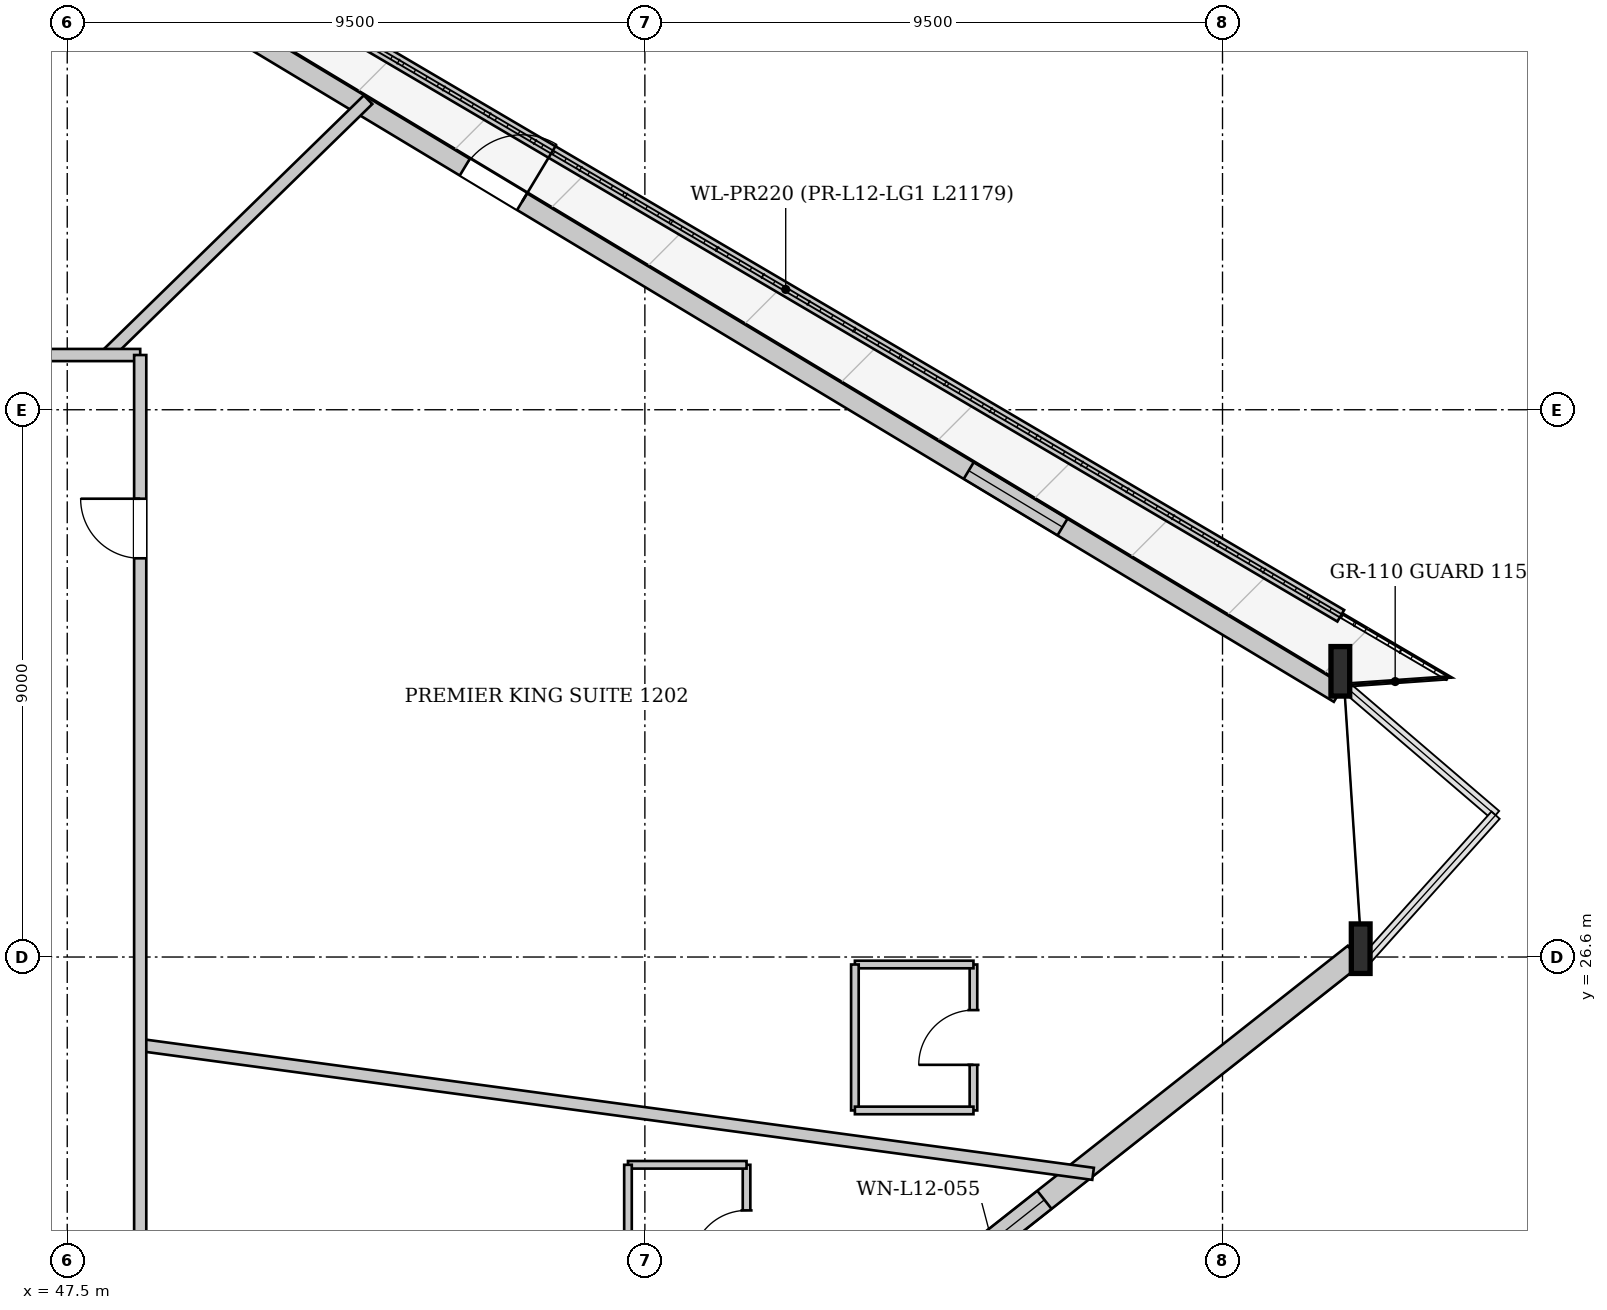
"""IFC4 building model, lengths in metres.
Left out: names, types, materials, properties, quantities, classifications, styles, units other than length and angle.
Written with IfcOpenShell. Run it as: python <this file> out.ifc"""

import sys

from ifc_helpers import new_model, si_unit, direction, frame, frame_2d, origin, origin_2d, place, context, subcontext, project, spatial, rectangle, i_section, extrude, source, transform, mapped, element, fill, save


model = new_model("IFC4")
c1 = context("Model", 3, precision=1e-05, world=origin(), true_north=direction((0.0, 1.0)))
c2 = subcontext(c1, "Body", "Model", "MODEL_VIEW")
j1 = project(units=[si_unit("LENGTHUNIT", "METRE"), si_unit("PLANEANGLEUNIT", "RADIAN")], contexts=[c1])
p1 = place(None, origin())
s1 = spatial("IfcSite", under=j1, at=p1, CompositionType="ELEMENT")
p2 = place(p1, origin())
s2 = spatial("IfcBuilding", under=s1, at=p2, CompositionType="ELEMENT")
p3 = place(p2, frame((0.0, 0.0, 50.6)))
s3 = spatial("IfcBuildingStorey", under=s2, at=p3, CompositionType="ELEMENT", Elevation=50.6)
m1 = source(origin(), c2, "Body", "SweptSolid", [
    extrude(i_section(OverallWidth=0.308, OverallDepth=0.814, WebThickness=0.021, FlangeThickness=0.04, at=origin_2d()), origin(), (0.0, 0.0, 1.0), 3.422),
])
p4 = place(p3, frame((68.796, 26.488, 0.0), z_axis=(-0.013841272978, 0.14576144688, 0.989222937343), x_axis=(-0.995521714847, -0.09453314375, 0.0)))
e1 = element("IfcColumn", 1, at=p4, inside=s3, PredefinedType="COLUMN", context=c2, shape_type="MappedRepresentation", body=[
    mapped(m1, transform((0.0, 0.0, 0.0), x_axis=(1.0, 0.0, 0.0), y_axis=(0.0, 1.0, 0.0), z_axis=(0.0, 0.0, 1.0), scale=1.0)),
])
m2 = source(origin(), c2, "Body", "SweptSolid", [
    extrude(i_section(OverallWidth=0.308, OverallDepth=0.814, WebThickness=0.021, FlangeThickness=0.04, at=origin_2d()), origin(), (0.0, 0.0, 1.0), 3.417),
])
p5 = place(p3, frame((68.496, 31.071, 0.0), z_axis=(-0.0340049427, 0.133233651545, 0.990501114572), x_axis=(-0.9689389037, -0.247300224215, 0.0)))
e2 = element("IfcColumn", 2, at=p5, inside=s3, PredefinedType="COLUMN", context=c2, shape_type="MappedRepresentation", body=[
    mapped(m2, transform((0.0, 0.0, 0.0), x_axis=(1.0, 0.0, 0.0), y_axis=(0.0, 1.0, 0.0), z_axis=(0.0, 0.0, 1.0), scale=1.0)),
])
p6 = place(p3, frame((47.967, 43.245, 0.0), z_axis=(0.0, 0.0, 1.0), x_axis=(0.856683150215, -0.515842980119, 0.0)))
e3 = element("IfcWall", 3, at=p6, inside=s3, PredefinedType="SOLIDWALL", context=c2, shape_type="SweptSolid", body=[
    extrude(rectangle(XDim=23.867, YDim=0.32, at=frame_2d((11.933, 0.0))), origin(), (0.0, 0.0, 1.0), 2.592),
])
p7 = place(p6, frame((7.087, 0.0, 0.0)))
e4 = element("IfcOpeningElement", 4, at=p7, cuts=e3, PredefinedType="OPENING", context=c2, shape_type="SweptSolid", body=[
    extrude(rectangle(XDim=1.1, YDim=2.3, at=frame_2d((0.55, 1.15))), frame((0.0, 0.17, 0.0), z_axis=(0.0, -1.0, 0.0), x_axis=(1.0, 0.0, 0.0)), (0.0, 0.0, 1.0), 0.34),
])
p8 = place(p6, frame((16.761, 0.0, 0.272)))
e5 = element("IfcOpeningElement", 5, at=p8, cuts=e3, PredefinedType="OPENING", context=c2, shape_type="SweptSolid", body=[
    extrude(rectangle(XDim=1.8, YDim=2.2, at=frame_2d((0.9, 1.1))), frame((0.0, 0.17, 0.0), z_axis=(0.0, -1.0, 0.0), x_axis=(1.0, 0.0, 0.0)), (0.0, 0.0, 1.0), 0.34),
])
p9 = place(p3, frame((68.679, 26.637, 0.0), z_axis=(0.0, 0.0, 1.0), x_axis=(-0.785087909817, -0.619384350674, 0.0)))
e6 = element("IfcWall", 6, at=p9, inside=s3, PredefinedType="SOLIDWALL", context=c2, shape_type="SweptSolid", body=[
    extrude(rectangle(XDim=24.487, YDim=0.38, at=frame_2d((12.244, 0.0))), origin(), (0.0, 0.0, 1.0), 2.592),
])
p10 = place(p9, frame((6.506, 0.0, 0.222)))
e7 = element("IfcOpeningElement", 7, at=p10, cuts=e6, PredefinedType="OPENING", context=c2, shape_type="SweptSolid", body=[
    extrude(rectangle(XDim=2.2, YDim=2.25, at=frame_2d((1.1, 1.125))), frame((0.0, 0.2, 0.0), z_axis=(0.0, -1.0, 0.0), x_axis=(1.0, 0.0, 0.0)), (0.0, 0.0, 1.0), 0.4),
])
p11 = place(p9, frame((16.531, 0.0, 0.222)))
e8 = element("IfcOpeningElement", 8, at=p11, cuts=e6, PredefinedType="OPENING", context=c2, shape_type="SweptSolid", body=[
    extrude(rectangle(XDim=2.2, YDim=2.25, at=frame_2d((1.1, 1.125))), frame((0.0, 0.2, 0.0), z_axis=(0.0, -1.0, 0.0), x_axis=(1.0, 0.0, 0.0)), (0.0, 0.0, 1.0), 0.4),
])
p12 = place(p3, frame((68.445, 32.212, 0.0), z_axis=(0.0, 0.0, 1.0), x_axis=(-0.862047097778, 0.506828177209, 0.0)))
e9 = element("IfcWall", 9, at=p12, inside=s3, PredefinedType="PARAPET", context=c2, shape_type="SweptSolid", body=[
    extrude(rectangle(XDim=21.179, YDim=0.22, at=frame_2d((10.589, 0.0))), origin(), (0.0, 0.0, 1.0), 0.3),
])
p13 = place(p3, frame((48.7, 25.153, 0.0), z_axis=(0.0, 0.0, 1.0), x_axis=(0.990982571001, -0.133990835404, 0.0)))
e10 = element("IfcWall", 10, at=p13, inside=s3, PredefinedType="PARTITIONING", context=c2, shape_type="SweptSolid", body=[
    extrude(rectangle(XDim=15.814, YDim=0.2, at=frame_2d((7.907, 0.0))), origin(), (0.0, 0.0, 1.0), 3.3),
])
p14 = place(p3, frame((48.145, 36.5, 0.0), z_axis=(0.0, 0.0, 1.0), x_axis=(0.715663611946, 0.698445126361, 0.0)))
e11 = element("IfcWall", 11, at=p14, inside=s3, PredefinedType="PARTITIONING", context=c2, shape_type="SweptSolid", body=[
    extrude(rectangle(XDim=6.012, YDim=0.2, at=frame_2d((3.006, 0.0))), origin(), (0.0, 0.0, 1.0), 3.3),
])
p15 = place(p3, frame((58.672, 20.783, 0.0), z_axis=(0.0, 0.0, 1.0), x_axis=(0.0, 1.0, 0.0)))
e12 = element("IfcWall", 12, at=p15, inside=s3, PredefinedType="PARTITIONING", context=c2, shape_type="SweptSolid", body=[
    extrude(rectangle(XDim=2.4, YDim=0.125, at=frame_2d((1.2, 0.0))), origin(), (0.0, 0.0, 1.0), 3.3),
])
p16 = place(p15, frame((0.75, 0.0, 0.0)))
e13 = element("IfcOpeningElement", 13, at=p16, cuts=e12, PredefinedType="OPENING", context=c2, shape_type="SweptSolid", body=[
    extrude(rectangle(XDim=0.9, YDim=2.1, at=frame_2d((0.45, 1.05))), frame((0.0, 0.073, 0.0), z_axis=(0.0, -1.0, 0.0), x_axis=(1.0, 0.0, 0.0)), (0.0, 0.0, 1.0), 0.145),
])
p17 = place(p3, frame((58.672, 23.183, 0.0), z_axis=(0.0, 0.0, 1.0), x_axis=(-1.0, 0.0, 0.0)))
e14 = element("IfcWall", 14, at=p17, inside=s3, PredefinedType="PARTITIONING", context=c2, shape_type="SweptSolid", body=[
    extrude(rectangle(XDim=1.95, YDim=0.125, at=frame_2d((0.975, 0.0))), origin(), (0.0, 0.0, 1.0), 3.3),
])
p18 = place(p3, frame((56.722, 23.183, 0.0), z_axis=(0.0, 0.0, 1.0), x_axis=(0.0, -1.0, 0.0)))
e15 = element("IfcWall", 15, at=p18, inside=s3, PredefinedType="PARTITIONING", context=c2, shape_type="SweptSolid", body=[
    extrude(rectangle(XDim=2.4, YDim=0.125, at=frame_2d((1.2, 0.0))), origin(), (0.0, 0.0, 1.0), 3.3),
])
p19 = place(p3, frame((62.404, 24.077, 0.0), z_axis=(0.0, 0.0, 1.0), x_axis=(0.0, 1.0, 0.0)))
e16 = element("IfcWall", 16, at=p19, inside=s3, PredefinedType="PARTITIONING", context=c2, shape_type="SweptSolid", body=[
    extrude(rectangle(XDim=2.4, YDim=0.125, at=frame_2d((1.2, 0.0))), origin(), (0.0, 0.0, 1.0), 3.3),
])
p20 = place(p19, frame((0.75, 0.0, 0.0)))
e17 = element("IfcOpeningElement", 17, at=p20, cuts=e16, PredefinedType="OPENING", context=c2, shape_type="SweptSolid", body=[
    extrude(rectangle(XDim=0.9, YDim=2.1, at=frame_2d((0.45, 1.05))), frame((0.0, 0.073, 0.0), z_axis=(0.0, -1.0, 0.0), x_axis=(1.0, 0.0, 0.0)), (0.0, 0.0, 1.0), 0.145),
])
p21 = place(p3, frame((62.404, 26.477, 0.0), z_axis=(0.0, 0.0, 1.0), x_axis=(-1.0, 0.0, 0.0)))
e18 = element("IfcWall", 18, at=p21, inside=s3, PredefinedType="PARTITIONING", context=c2, shape_type="SweptSolid", body=[
    extrude(rectangle(XDim=1.95, YDim=0.125, at=frame_2d((0.975, 0.0))), origin(), (0.0, 0.0, 1.0), 3.3),
])
p22 = place(p3, frame((60.454, 26.477, 0.0), z_axis=(0.0, 0.0, 1.0), x_axis=(0.0, -1.0, 0.0)))
e19 = element("IfcWall", 19, at=p22, inside=s3, PredefinedType="PARTITIONING", context=c2, shape_type="SweptSolid", body=[
    extrude(rectangle(XDim=2.4, YDim=0.125, at=frame_2d((1.2, 0.0))), origin(), (0.0, 0.0, 1.0), 3.3),
])
p23 = place(p3, frame((60.454, 24.077, 0.0), z_axis=(0.0, 0.0, 1.0), x_axis=(1.0, 0.0, 0.0)))
e20 = element("IfcWall", 20, at=p23, inside=s3, PredefinedType="PARTITIONING", context=c2, shape_type="SweptSolid", body=[
    extrude(rectangle(XDim=1.95, YDim=0.125, at=frame_2d((0.975, 0.0))), origin(), (0.0, 0.0, 1.0), 3.3),
])
p24 = place(p3, frame((27.3, 36.5, 0.0), z_axis=(0.0, 0.0, 1.0), x_axis=(1.0, 0.0, 0.0)))
e21 = element("IfcWall", 21, at=p24, inside=s3, PredefinedType="PARTITIONING", context=c2, shape_type="SweptSolid", body=[
    extrude(rectangle(XDim=21.4, YDim=0.2, at=frame_2d((10.7, 0.0))), origin(), (0.0, 0.0, 1.0), 3.3),
])
p25 = place(p24, frame((16.992, 0.0, 0.0)))
e22 = element("IfcOpeningElement", 22, at=p25, cuts=e21, PredefinedType="OPENING", context=c2, shape_type="SweptSolid", body=[
    extrude(rectangle(XDim=0.98, YDim=2.15, at=frame_2d((0.49, 1.075))), frame((0.0, 0.11, 0.0), z_axis=(0.0, -1.0, 0.0), x_axis=(1.0, 0.0, 0.0)), (0.0, 0.0, 1.0), 0.22),
])
p26 = place(p3, frame((48.7, 16.7, 0.0), z_axis=(0.0, 0.0, 1.0), x_axis=(0.0, 1.0, 0.0)))
e23 = element("IfcWall", 23, at=p26, inside=s3, PredefinedType="PARTITIONING", context=c2, shape_type="SweptSolid", body=[
    extrude(rectangle(XDim=19.8, YDim=0.2, at=frame_2d((9.9, 0.0))), origin(), (0.0, 0.0, 1.0), 3.3),
])
p27 = place(p26, frame((16.457, 0.0, 0.0)))
e24 = element("IfcOpeningElement", 24, at=p27, cuts=e23, PredefinedType="OPENING", context=c2, shape_type="SweptSolid", body=[
    extrude(rectangle(XDim=0.98, YDim=2.15, at=frame_2d((0.49, 1.075))), frame((0.0, 0.11, 0.0), z_axis=(0.0, -1.0, 0.0), x_axis=(1.0, 0.0, 0.0)), (0.0, 0.0, 1.0), 0.22),
])
m3 = source(origin(), c2, "Body", "SweptSolid", [
    extrude(rectangle(XDim=1.1, YDim=2.3, at=frame_2d((0.55, 1.15))), frame((0.0, 0.025, 0.0), z_axis=(0.0, -1.0, 0.0), x_axis=(1.0, 0.0, 0.0)), (0.0, 0.0, 1.0), 0.05),
])
p28 = place(p7, origin())
e25 = element("IfcDoor", 25, at=p28, inside=s3, OperationType="SINGLE_SWING_RIGHT", PredefinedType="DOOR", context=c2, shape_type="MappedRepresentation", body=[
    mapped(m3, transform((0.0, 0.0, 0.0), x_axis=(1.0, 0.0, 0.0), y_axis=(0.0, 1.0, 0.0), z_axis=(0.0, 0.0, 1.0), scale=1.0)),
])
fill(e4, e25)
m4 = source(origin(), c2, "Body", "SweptSolid", [
    extrude(rectangle(XDim=1.8, YDim=2.2, at=frame_2d((0.9, 1.1))), frame((0.0, 0.03, 0.0), z_axis=(0.0, -1.0, 0.0), x_axis=(1.0, 0.0, 0.0)), (0.0, 0.0, 1.0), 0.06),
])
p29 = place(p8, origin())
e26 = element("IfcWindow", 26, at=p29, inside=s3, PartitioningType="SINGLE_PANEL", PredefinedType="WINDOW", context=c2, shape_type="MappedRepresentation", body=[
    mapped(m4, transform((0.0, 0.0, 0.0), x_axis=(1.0, 0.0, 0.0), y_axis=(0.0, 1.0, 0.0), z_axis=(0.0, 0.0, 1.0), scale=1.0)),
])
fill(e5, e26)
m5 = source(origin(), c2, "Body", "SweptSolid", [
    extrude(rectangle(XDim=2.2, YDim=2.25, at=frame_2d((1.1, 1.125))), frame((0.0, 0.03, 0.0), z_axis=(0.0, -1.0, 0.0), x_axis=(1.0, 0.0, 0.0)), (0.0, 0.0, 1.0), 0.06),
])
p30 = place(p10, origin())
e27 = element("IfcWindow", 27, at=p30, inside=s3, PartitioningType="SINGLE_PANEL", PredefinedType="WINDOW", context=c2, shape_type="MappedRepresentation", body=[
    mapped(m5, transform((0.0, 0.0, 0.0), x_axis=(1.0, 0.0, 0.0), y_axis=(0.0, 1.0, 0.0), z_axis=(0.0, 0.0, 1.0), scale=1.0)),
])
fill(e7, e27)
m6 = source(origin(), c2, "Body", "SweptSolid", [
    extrude(rectangle(XDim=0.9, YDim=2.1, at=frame_2d((0.45, 1.05))), frame((0.0, 0.025, 0.0), z_axis=(0.0, -1.0, 0.0), x_axis=(1.0, 0.0, 0.0)), (0.0, 0.0, 1.0), 0.05),
])
p31 = place(p16, origin())
e28 = element("IfcDoor", 28, at=p31, inside=s3, OperationType="SINGLE_SWING_LEFT", PredefinedType="DOOR", context=c2, shape_type="MappedRepresentation", body=[
    mapped(m6, transform((0.0, 0.0, 0.0), x_axis=(1.0, 0.0, 0.0), y_axis=(0.0, 1.0, 0.0), z_axis=(0.0, 0.0, 1.0), scale=1.0)),
])
fill(e13, e28)
p32 = place(p20, origin())
e29 = element("IfcDoor", 29, at=p32, inside=s3, OperationType="SINGLE_SWING_LEFT", PredefinedType="DOOR", context=c2, shape_type="MappedRepresentation", body=[
    mapped(m6, transform((0.0, 0.0, 0.0), x_axis=(1.0, 0.0, 0.0), y_axis=(0.0, 1.0, 0.0), z_axis=(0.0, 0.0, 1.0), scale=1.0)),
])
fill(e17, e29)
m7 = source(origin(), c2, "Body", "SweptSolid", [
    extrude(rectangle(XDim=0.98, YDim=2.15, at=frame_2d((0.49, 1.075))), frame((0.0, 0.025, 0.0), z_axis=(0.0, -1.0, 0.0), x_axis=(1.0, 0.0, 0.0)), (0.0, 0.0, 1.0), 0.05),
])
p33 = place(p27, origin())
e30 = element("IfcDoor", 30, at=p33, inside=s3, OperationType="SINGLE_SWING_RIGHT", PredefinedType="DOOR", context=c2, shape_type="MappedRepresentation", body=[
    mapped(m7, transform((0.0, 0.0, 0.0), x_axis=(1.0, 0.0, 0.0), y_axis=(0.0, 1.0, 0.0), z_axis=(0.0, 0.0, 1.0), scale=1.0)),
])
fill(e24, e30)
save(model, sys.argv[1])
